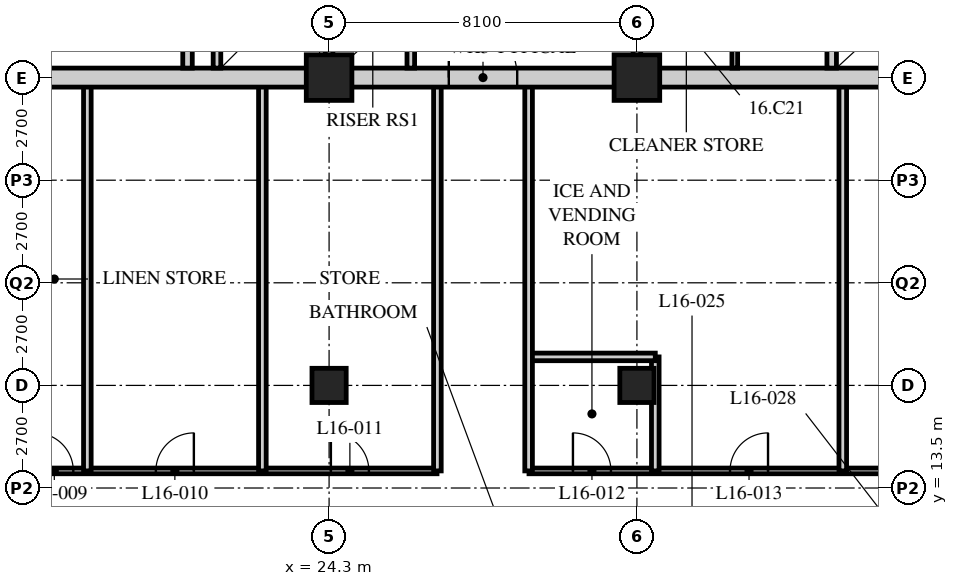
"""IFC4 building model, lengths in metres.
Left out: names, types, materials, properties, quantities, classifications, styles, units other than length and angle.
Written with IfcOpenShell. Run it as: python <this file> out.ifc"""

import sys

from ifc_helpers import new_model, si_unit, direction, frame, frame_2d, origin, origin_2d, place, context, subcontext, project, spatial, rectangle, hollow_rectangle, extrude, element, fill, save


model = new_model("IFC4")
c1 = context("Model", 3, precision=1e-05, world=origin(), true_north=direction((0.0, 1.0)))
c2 = subcontext(c1, "Body", "Model", "MODEL_VIEW")
j1 = project(units=[si_unit("LENGTHUNIT", "METRE"), si_unit("PLANEANGLEUNIT", "RADIAN")], contexts=[c1])
p1 = place(None, origin())
s1 = spatial("IfcSite", under=j1, at=p1, CompositionType="ELEMENT")
p2 = place(p1, origin())
s2 = spatial("IfcBuilding", under=s1, at=p2, CompositionType="ELEMENT")
p3 = place(p2, frame((0.0, 0.0, 67.0)))
s3 = spatial("IfcBuildingStorey", under=s2, at=p3, CompositionType="ELEMENT", Elevation=67.0)
p4 = place(p3, frame((24.3, 16.2, 0.0), z_axis=(0.0, 0.0, 1.0), x_axis=(1.0, 0.0, 0.0)))
e1 = element("IfcColumn", 1, at=p4, inside=s3, PredefinedType="COLUMN", context=c2, shape_type="SweptSolid", body=[
    extrude(hollow_rectangle(XDim=0.9, YDim=0.9, WallThickness=0.09, at=origin_2d()), origin(), (0.0, 0.0, 1.0), 3.4),
])
p5 = place(p3, frame((24.3, 24.3, 0.0), z_axis=(0.0, 0.0, 1.0), x_axis=(1.0, 0.0, 0.0)))
e2 = element("IfcColumn", 2, at=p5, inside=s3, PredefinedType="COLUMN", context=c2, shape_type="SweptSolid", body=[
    extrude(hollow_rectangle(XDim=1.2, YDim=1.2, WallThickness=0.12, at=origin_2d()), origin(), (0.0, 0.0, 1.0), 3.4),
])
p6 = place(p3, frame((32.4, 16.2, 0.0), z_axis=(0.0, 0.0, 1.0), x_axis=(1.0, 0.0, 0.0)))
e3 = element("IfcColumn", 3, at=p6, inside=s3, PredefinedType="COLUMN", context=c2, shape_type="SweptSolid", body=[
    extrude(hollow_rectangle(XDim=0.9, YDim=0.9, WallThickness=0.09, at=origin_2d()), origin(), (0.0, 0.0, 1.0), 3.4),
])
p7 = place(p3, frame((32.4, 24.3, 0.0), z_axis=(0.0, 0.0, 1.0), x_axis=(1.0, 0.0, 0.0)))
e4 = element("IfcColumn", 4, at=p7, inside=s3, PredefinedType="COLUMN", context=c2, shape_type="SweptSolid", body=[
    extrude(hollow_rectangle(XDim=1.2, YDim=1.2, WallThickness=0.12, at=origin_2d()), origin(), (0.0, 0.0, 1.0), 3.4),
])
p8 = place(p3, frame((9.9, 13.95, 0.0), z_axis=(0.0, 0.0, 1.0), x_axis=(1.0, 0.0, 0.0)))
e5 = element("IfcWall", 5, at=p8, inside=s3, PredefinedType="PARTITIONING", context=c2, shape_type="SweptSolid", body=[
    extrude(rectangle(XDim=17.24, YDim=0.15, at=frame_2d((8.62, 0.0))), origin(), (0.0, 0.0, 1.0), 3.19),
])
p9 = place(p8, frame((0.37, 0.0, 0.0)))
e6 = element("IfcOpeningElement", 6, at=p9, cuts=e5, PredefinedType="OPENING", context=c2, shape_type="SweptSolid", body=[
    extrude(rectangle(XDim=1.0, YDim=2.1, at=frame_2d((0.5, 1.05))), frame((0.0, 0.085, 0.0), z_axis=(0.0, -1.0, 0.0), x_axis=(1.0, 0.0, 0.0)), (0.0, 0.0, 1.0), 0.17),
])
p10 = place(p8, frame((3.52, 0.0, 0.0)))
e7 = element("IfcOpeningElement", 7, at=p10, cuts=e5, PredefinedType="OPENING", context=c2, shape_type="SweptSolid", body=[
    extrude(rectangle(XDim=1.0, YDim=2.1, at=frame_2d((0.5, 1.05))), frame((0.0, 0.085, 0.0), z_axis=(0.0, -1.0, 0.0), x_axis=(1.0, 0.0, 0.0)), (0.0, 0.0, 1.0), 0.17),
])
p11 = place(p8, frame((6.67, 0.0, 0.0)))
e8 = element("IfcOpeningElement", 8, at=p11, cuts=e5, PredefinedType="OPENING", context=c2, shape_type="SweptSolid", body=[
    extrude(rectangle(XDim=1.0, YDim=2.1, at=frame_2d((0.5, 1.05))), frame((0.0, 0.085, 0.0), z_axis=(0.0, -1.0, 0.0), x_axis=(1.0, 0.0, 0.0)), (0.0, 0.0, 1.0), 0.17),
])
p12 = place(p8, frame((9.842, 0.0, 0.0)))
e9 = element("IfcOpeningElement", 9, at=p12, cuts=e5, PredefinedType="OPENING", context=c2, shape_type="SweptSolid", body=[
    extrude(rectangle(XDim=1.0, YDim=2.1, at=frame_2d((0.5, 1.05))), frame((0.0, 0.085, 0.0), z_axis=(0.0, -1.0, 0.0), x_axis=(1.0, 0.0, 0.0)), (0.0, 0.0, 1.0), 0.17),
])
p13 = place(p8, frame((14.447, 0.0, 0.0)))
e10 = element("IfcOpeningElement", 10, at=p13, cuts=e5, PredefinedType="OPENING", context=c2, shape_type="SweptSolid", body=[
    extrude(rectangle(XDim=1.0, YDim=2.1, at=frame_2d((0.5, 1.05))), frame((0.0, 0.085, 0.0), z_axis=(0.0, -1.0, 0.0), x_axis=(1.0, 0.0, 0.0)), (0.0, 0.0, 1.0), 0.17),
])
p14 = place(p3, frame((29.56, 13.95, 0.0), z_axis=(0.0, 0.0, 1.0), x_axis=(1.0, 0.0, 0.0)))
e11 = element("IfcWall", 11, at=p14, inside=s3, PredefinedType="PARTITIONING", context=c2, shape_type="SweptSolid", body=[
    extrude(rectangle(XDim=13.19, YDim=0.15, at=frame_2d((6.595, 0.0))), origin(), (0.0, 0.0, 1.0), 3.19),
])
p15 = place(p14, frame((1.157, 0.0, 0.0)))
e12 = element("IfcOpeningElement", 12, at=p15, cuts=e11, PredefinedType="OPENING", context=c2, shape_type="SweptSolid", body=[
    extrude(rectangle(XDim=1.0, YDim=2.1, at=frame_2d((0.5, 1.05))), frame((0.0, 0.085, 0.0), z_axis=(0.0, -1.0, 0.0), x_axis=(1.0, 0.0, 0.0)), (0.0, 0.0, 1.0), 0.17),
])
p16 = place(p14, frame((5.29, 0.0, 0.0)))
e13 = element("IfcOpeningElement", 13, at=p16, cuts=e11, PredefinedType="OPENING", context=c2, shape_type="SweptSolid", body=[
    extrude(rectangle(XDim=1.0, YDim=2.1, at=frame_2d((0.5, 1.05))), frame((0.0, 0.085, 0.0), z_axis=(0.0, -1.0, 0.0), x_axis=(1.0, 0.0, 0.0)), (0.0, 0.0, 1.0), 0.17),
])
p17 = place(p14, frame((10.223, 0.0, 0.0)))
e14 = element("IfcOpeningElement", 14, at=p17, cuts=e11, PredefinedType="OPENING", context=c2, shape_type="SweptSolid", body=[
    extrude(rectangle(XDim=1.0, YDim=2.1, at=frame_2d((0.5, 1.05))), frame((0.0, 0.085, 0.0), z_axis=(0.0, -1.0, 0.0), x_axis=(1.0, 0.0, 0.0)), (0.0, 0.0, 1.0), 0.17),
])
for number, where, z_axis, x_axis in (
    (15, (17.939, 13.95, 0.0), (0.0, 0.0, 1.0), (0.0, 1.0, 0.0)),
    (16, (22.545, 13.95, 0.0), (0.0, 0.0, 1.0), (0.0, 1.0, 0.0)),
):
    element("IfcWall", number, at=place(p3, frame(where, z_axis=z_axis, x_axis=x_axis)), inside=s3, PredefinedType="SOLIDWALL", context=c2, shape_type="SweptSolid", body=[
        extrude(rectangle(XDim=10.35, YDim=0.2, at=frame_2d((5.175, 0.0))), origin(), (0.0, 0.0, 1.0), 3.19),
    ])
p18 = place(p3, frame((32.883, 13.95, 0.0), z_axis=(0.0, 0.0, 1.0), x_axis=(0.0, 1.0, 0.0)))
e17 = element("IfcWall", 17, at=p18, inside=s3, PredefinedType="SOLIDWALL", context=c2, shape_type="SweptSolid", body=[
    extrude(rectangle(XDim=3.0, YDim=0.2, at=frame_2d((1.5, 0.0))), origin(), (0.0, 0.0, 1.0), 3.19),
])
p19 = place(p3, frame((29.55, 16.95, 0.0), z_axis=(0.0, 0.0, 1.0), x_axis=(1.0, 0.0, 0.0)))
e18 = element("IfcWall", 18, at=p19, inside=s3, PredefinedType="SOLIDWALL", context=c2, shape_type="SweptSolid", body=[
    extrude(rectangle(XDim=3.333, YDim=0.2, at=frame_2d((1.667, 0.0))), origin(), (0.0, 0.0, 1.0), 3.19),
])
for number, where, z_axis, x_axis in (
    (19, (37.817, 13.95, 0.0), (0.0, 0.0, 1.0), (0.0, 1.0, 0.0)),
    (20, (27.15, 13.95, 0.0), (0.0, 0.0, 1.0), (0.0, 1.0, 0.0)),
    (21, (29.55, 13.95, 0.0), (0.0, 0.0, 1.0), (0.0, 1.0, 0.0)),
):
    element("IfcWall", number, at=place(p3, frame(where, z_axis=z_axis, x_axis=x_axis)), inside=s3, PredefinedType="SOLIDWALL", context=c2, shape_type="SweptSolid", body=[
        extrude(rectangle(XDim=10.35, YDim=0.2, at=frame_2d((5.175, 0.0))), origin(), (0.0, 0.0, 1.0), 3.19),
    ])
p20 = place(p3, frame((15.95, 24.3, 0.0), z_axis=(0.0, 0.0, 1.0), x_axis=(1.0, 0.0, 0.0)))
e22 = element("IfcWall", 22, at=p20, inside=s3, PredefinedType="SOLIDWALL", context=c2, shape_type="SweptSolid", body=[
    extrude(rectangle(XDim=24.8, YDim=0.5, at=frame_2d((12.4, 0.0))), origin(), (0.0, 0.0, 1.0), 2.54),
])
p21 = place(p20, frame((11.5, 0.0, 0.0)))
e23 = element("IfcOpeningElement", 23, at=p21, cuts=e22, PredefinedType="OPENING", context=c2, shape_type="SweptSolid", body=[
    extrude(rectangle(XDim=1.8, YDim=2.4, at=frame_2d((0.9, 1.2))), frame((0.0, 0.26, 0.0), z_axis=(0.0, -1.0, 0.0), x_axis=(1.0, 0.0, 0.0)), (0.0, 0.0, 1.0), 0.52),
])
p22 = place(p3, frame((24.3, 24.55, 0.0), z_axis=(0.0, 0.0, 1.0), x_axis=(0.0, 1.0, 0.0)))
e24 = element("IfcWall", 24, at=p22, inside=s3, PredefinedType="SOLIDWALL", context=c2, shape_type="SweptSolid", body=[
    extrude(rectangle(XDim=7.75, YDim=0.2, at=frame_2d((3.875, 0.0))), origin(), (0.0, 0.0, 1.0), 2.578),
])
p23 = place(p22, frame((4.6, 0.0, 0.0)))
e25 = element("IfcOpeningElement", 25, at=p23, cuts=e24, PredefinedType="OPENING", context=c2, shape_type="SweptSolid", body=[
    extrude(rectangle(XDim=1.2, YDim=2.1, at=frame_2d((0.6, 1.05))), frame((0.0, 0.11, 0.0), z_axis=(0.0, -1.0, 0.0), x_axis=(1.0, 0.0, 0.0)), (0.0, 0.0, 1.0), 0.22),
])
p24 = place(p3, frame((20.575, 24.55, 0.0), z_axis=(0.0, 0.0, 1.0), x_axis=(0.0, 1.0, 0.0)))
e26 = element("IfcWall", 26, at=p24, inside=s3, PredefinedType="SOLIDWALL", context=c2, shape_type="SweptSolid", body=[
    extrude(rectangle(XDim=7.75, YDim=0.25, at=frame_2d((3.875, 0.0))), origin(), (0.0, 0.0, 1.0), 3.19),
])
p25 = place(p24, frame((6.2, 0.0, 0.0)))
e27 = element("IfcOpeningElement", 27, at=p25, cuts=e26, PredefinedType="OPENING", context=c2, shape_type="SweptSolid", body=[
    extrude(rectangle(XDim=1.2, YDim=2.1, at=frame_2d((0.6, 1.05))), frame((0.0, 0.135, 0.0), z_axis=(0.0, -1.0, 0.0), x_axis=(1.0, 0.0, 0.0)), (0.0, 0.0, 1.0), 0.27),
])
p26 = place(p3, frame((21.35, 24.55, 0.0), z_axis=(0.0, 0.0, 1.0), x_axis=(0.0, 1.0, 0.0)))
e28 = element("IfcWall", 28, at=p26, inside=s3, PredefinedType="SOLIDWALL", context=c2, shape_type="SweptSolid", body=[
    extrude(rectangle(XDim=2.6, YDim=0.2, at=frame_2d((1.3, 0.0))), origin(), (0.0, 0.0, 1.0), 3.19),
])
p27 = place(p3, frame((26.45, 24.55, 0.0), z_axis=(0.0, 0.0, 1.0), x_axis=(0.0, 1.0, 0.0)))
e29 = element("IfcWall", 29, at=p27, inside=s3, PredefinedType="SOLIDWALL", context=c2, shape_type="SweptSolid", body=[
    extrude(rectangle(XDim=1.6, YDim=0.2, at=frame_2d((0.8, 0.0))), origin(), (0.0, 0.0, 1.0), 3.19),
])
p28 = place(p3, frame((37.525, 24.55, 0.0), z_axis=(0.0, 0.0, 1.0), x_axis=(0.0, 1.0, 0.0)))
e30 = element("IfcWall", 30, at=p28, inside=s3, PredefinedType="SOLIDWALL", context=c2, shape_type="SweptSolid", body=[
    extrude(rectangle(XDim=7.75, YDim=0.25, at=frame_2d((3.875, 0.0))), origin(), (0.0, 0.0, 1.0), 3.19),
])
p29 = place(p3, frame((32.4, 24.55, 0.0), z_axis=(0.0, 0.0, 1.0), x_axis=(0.0, 1.0, 0.0)))
e31 = element("IfcWall", 31, at=p29, inside=s3, PredefinedType="PARTITIONING", context=c2, shape_type="SweptSolid", body=[
    extrude(rectangle(XDim=7.75, YDim=0.2, at=frame_2d((3.875, 0.0))), origin(), (0.0, 0.0, 1.0), 2.578),
])
p30 = place(p29, frame((0.65, 0.0, 0.0)))
e32 = element("IfcOpeningElement", 32, at=p30, cuts=e31, PredefinedType="OPENING", context=c2, shape_type="SweptSolid", body=[
    extrude(rectangle(XDim=0.9, YDim=2.1, at=frame_2d((0.45, 1.05))), frame((0.0, 0.11, 0.0), z_axis=(0.0, -1.0, 0.0), x_axis=(1.0, 0.0, 0.0)), (0.0, 0.0, 1.0), 0.22),
])
p31 = place(p29, frame((2.15, 0.0, 0.0)))
e33 = element("IfcOpeningElement", 33, at=p31, cuts=e31, PredefinedType="OPENING", context=c2, shape_type="SweptSolid", body=[
    extrude(rectangle(XDim=0.9, YDim=2.1, at=frame_2d((0.45, 1.05))), frame((0.0, 0.11, 0.0), z_axis=(0.0, -1.0, 0.0), x_axis=(1.0, 0.0, 0.0)), (0.0, 0.0, 1.0), 0.22),
])
p32 = place(p29, frame((3.8, 0.0, 0.0)))
e34 = element("IfcOpeningElement", 34, at=p32, cuts=e31, PredefinedType="OPENING", context=c2, shape_type="SweptSolid", body=[
    extrude(rectangle(XDim=1.0, YDim=2.1, at=frame_2d((0.5, 1.05))), frame((0.0, 0.11, 0.0), z_axis=(0.0, -1.0, 0.0), x_axis=(1.0, 0.0, 0.0)), (0.0, 0.0, 1.0), 0.22),
])
p33 = place(p29, frame((6.05, 0.0, 0.0)))
e35 = element("IfcOpeningElement", 35, at=p33, cuts=e31, PredefinedType="OPENING", context=c2, shape_type="SweptSolid", body=[
    extrude(rectangle(XDim=0.9, YDim=2.1, at=frame_2d((0.45, 1.05))), frame((0.0, 0.11, 0.0), z_axis=(0.0, -1.0, 0.0), x_axis=(1.0, 0.0, 0.0)), (0.0, 0.0, 1.0), 0.22),
])
p34 = place(p3, frame((34.975, 24.55, 0.0), z_axis=(0.0, 0.0, 1.0), x_axis=(0.0, 1.0, 0.0)))
e36 = element("IfcWall", 36, at=p34, inside=s3, PredefinedType="PARTITIONING", context=c2, shape_type="SweptSolid", body=[
    extrude(rectangle(XDim=1.7, YDim=0.15, at=frame_2d((0.85, 0.0))), origin(), (0.0, 0.0, 1.0), 3.19),
])
p35 = place(p11, origin())
e37 = element("IfcDoor", 37, at=p35, inside=s3, OperationType="SINGLE_SWING_LEFT", PredefinedType="DOOR", context=c2, shape_type="SweptSolid", body=[
    extrude(rectangle(XDim=1.0, YDim=2.1, at=frame_2d((0.5, 1.05))), frame((0.0, 0.025, 0.0), z_axis=(0.0, -1.0, 0.0), x_axis=(1.0, 0.0, 0.0)), (0.0, 0.0, 1.0), 0.05),
])
fill(e8, e37)
p36 = place(p12, origin())
e38 = element("IfcDoor", 38, at=p36, inside=s3, OperationType="SINGLE_SWING_RIGHT", PredefinedType="DOOR", context=c2, shape_type="SweptSolid", body=[
    extrude(rectangle(XDim=1.0, YDim=2.1, at=frame_2d((0.5, 1.05))), frame((0.0, 0.025, 0.0), z_axis=(0.0, -1.0, 0.0), x_axis=(1.0, 0.0, 0.0)), (0.0, 0.0, 1.0), 0.05),
])
fill(e9, e38)
p37 = place(p13, origin())
e39 = element("IfcDoor", 39, at=p37, inside=s3, OperationType="SINGLE_SWING_LEFT", PredefinedType="DOOR", context=c2, shape_type="SweptSolid", body=[
    extrude(rectangle(XDim=1.0, YDim=2.1, at=frame_2d((0.5, 1.05))), frame((0.0, 0.025, 0.0), z_axis=(0.0, -1.0, 0.0), x_axis=(1.0, 0.0, 0.0)), (0.0, 0.0, 1.0), 0.05),
])
fill(e10, e39)
p38 = place(p15, origin())
e40 = element("IfcDoor", 40, at=p38, inside=s3, OperationType="SINGLE_SWING_LEFT", PredefinedType="DOOR", context=c2, shape_type="SweptSolid", body=[
    extrude(rectangle(XDim=1.0, YDim=2.1, at=frame_2d((0.5, 1.05))), frame((0.0, 0.025, 0.0), z_axis=(0.0, -1.0, 0.0), x_axis=(1.0, 0.0, 0.0)), (0.0, 0.0, 1.0), 0.05),
])
fill(e12, e40)
p39 = place(p16, origin())
e41 = element("IfcDoor", 41, at=p39, inside=s3, OperationType="SINGLE_SWING_RIGHT", PredefinedType="DOOR", context=c2, shape_type="SweptSolid", body=[
    extrude(rectangle(XDim=1.0, YDim=2.1, at=frame_2d((0.5, 1.05))), frame((0.0, 0.025, 0.0), z_axis=(0.0, -1.0, 0.0), x_axis=(1.0, 0.0, 0.0)), (0.0, 0.0, 1.0), 0.05),
])
fill(e13, e41)
p40 = place(p21, origin())
e42 = element("IfcDoor", 42, at=p40, inside=s3, OperationType="DOUBLE_DOOR_SINGLE_SWING", PredefinedType="DOOR", context=c2, shape_type="SweptSolid", body=[
    extrude(rectangle(XDim=1.8, YDim=2.4, at=frame_2d((0.9, 1.2))), frame((0.0, 0.025, 0.0), z_axis=(0.0, -1.0, 0.0), x_axis=(1.0, 0.0, 0.0)), (0.0, 0.0, 1.0), 0.05),
])
fill(e23, e42)
save(model, sys.argv[1])
